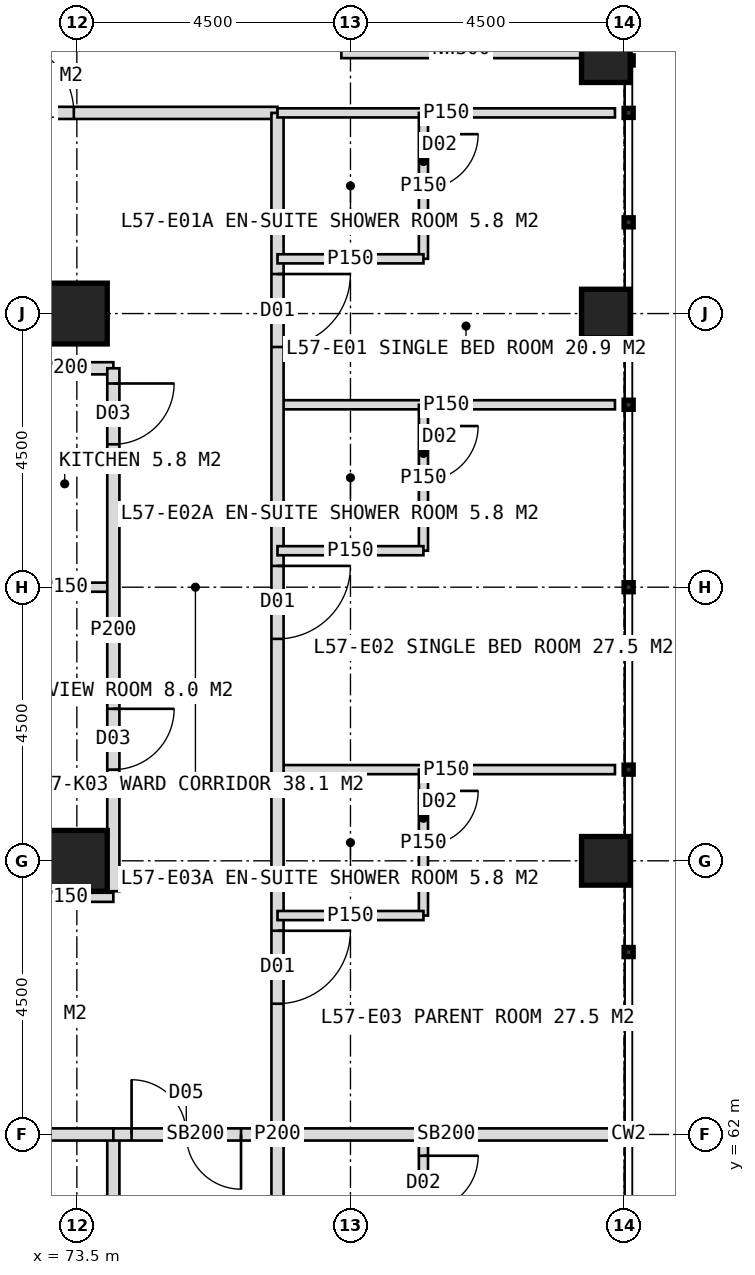
"""IFC4 building model, lengths in metres.
Left out: names, types, materials, properties, quantities, classifications, styles, units other than length and angle.
Written with IfcOpenShell. Run it as: python <this file> out.ifc"""

import sys

from ifc_helpers import new_model, si_unit, direction, frame, frame_2d, origin, origin_2d, place, context, subcontext, project, spatial, rectangle, hollow_rectangle, extrude, element, fill, save


model = new_model("IFC4")
c1 = context("Model", 3, precision=1e-05, world=origin(), true_north=direction((0.0, 1.0)))
c2 = subcontext(c1, "Body", "Model", "MODEL_VIEW")
j1 = project(units=[si_unit("LENGTHUNIT", "METRE"), si_unit("PLANEANGLEUNIT", "RADIAN")], contexts=[c1])
p1 = place(None, origin())
s1 = spatial("IfcSite", under=j1, at=p1, CompositionType="ELEMENT")
p2 = place(p1, origin())
s2 = spatial("IfcBuilding", under=s1, at=p2, CompositionType="ELEMENT")
p3 = place(p2, frame((0.0, 0.0, 237.0)))
s3 = spatial("IfcBuildingStorey", under=s2, at=p3, CompositionType="ELEMENT", Elevation=237.0)
for number, where, z_axis, x_axis in (
    (1, (73.5, 75.5, 0.0), (0.0, 0.0, 1.0), (1.0, 0.0, 0.0)),
    (2, (73.5, 66.5, 0.0), (0.0, 0.0, 1.0), (1.0, 0.0, 0.0)),
):
    element("IfcColumn", number, at=place(p3, frame(where, z_axis=z_axis, x_axis=x_axis)), inside=s3, PredefinedType="COLUMN", context=c2, shape_type="SweptSolid", body=[
        extrude(hollow_rectangle(XDim=1.0, YDim=1.0, WallThickness=0.1, at=origin_2d()), origin(), (0.0, 0.0, 1.0), 4.0),
    ])
for number, where, z_axis, x_axis in (
    (3, (82.2, 66.5, 0.0), (0.0, 0.0, 1.0), (1.0, 0.0, 0.0)),
    (4, (82.2, 75.5, 0.0), (0.0, 0.0, 1.0), (1.0, 0.0, 0.0)),
    (5, (82.2, 79.7, 0.0), (0.0, 0.0, 1.0), (1.0, 0.0, 0.0)),
):
    element("IfcColumn", number, at=place(p3, frame(where, z_axis=z_axis, x_axis=x_axis)), inside=s3, PredefinedType="COLUMN", context=c2, shape_type="SweptSolid", body=[
        extrude(hollow_rectangle(XDim=0.8, YDim=0.8, WallThickness=0.08, at=origin_2d()), origin(), (0.0, 0.0, 1.0), 4.0),
    ])
p4 = place(p3, frame((77.85, 79.85, 0.0), z_axis=(0.0, 0.0, 1.0), x_axis=(1.0, 0.0, 0.0)))
e6 = element("IfcWall", 6, at=p4, inside=s3, PredefinedType="ELEMENTEDWALL", context=c2, shape_type="SweptSolid", body=[
    extrude(rectangle(XDim=3.95, YDim=0.3, at=frame_2d((1.975, 0.0))), origin(), (0.0, 0.0, 1.0), 2.85),
])
p5 = place(p3, frame((43.2, 78.8, 0.0), z_axis=(0.0, 0.0, 1.0), x_axis=(1.0, 0.0, 0.0)))
e7 = element("IfcWall", 7, at=p5, inside=s3, PredefinedType="PARTITIONING", context=c2, shape_type="SweptSolid", body=[
    extrude(rectangle(XDim=33.6, YDim=0.2, at=frame_2d((16.8, 0.0))), origin(), (0.0, 0.0, 1.0), 3.75),
])
p6 = place(p5, frame((3.4, 0.0, 0.0)))
e8 = element("IfcOpeningElement", 8, at=p6, cuts=e7, PredefinedType="OPENING", context=c2, shape_type="SweptSolid", body=[
    extrude(rectangle(XDim=1.0, YDim=2.1, at=frame_2d((0.5, 1.05))), frame((0.0, 0.11, 0.0), z_axis=(0.0, -1.0, 0.0), x_axis=(1.0, 0.0, 0.0)), (0.0, 0.0, 1.0), 0.22),
])
p7 = place(p5, frame((11.05, 0.0, 0.0)))
e9 = element("IfcOpeningElement", 9, at=p7, cuts=e7, PredefinedType="OPENING", context=c2, shape_type="SweptSolid", body=[
    extrude(rectangle(XDim=1.2, YDim=2.2, at=frame_2d((0.6, 1.1))), frame((0.0, 0.11, 0.0), z_axis=(0.0, -1.0, 0.0), x_axis=(1.0, 0.0, 0.0)), (0.0, 0.0, 1.0), 0.22),
])
p8 = place(p5, frame((20.05, 0.0, 0.0)))
e10 = element("IfcOpeningElement", 10, at=p8, cuts=e7, PredefinedType="OPENING", context=c2, shape_type="SweptSolid", body=[
    extrude(rectangle(XDim=1.2, YDim=2.2, at=frame_2d((0.6, 1.1))), frame((0.0, 0.11, 0.0), z_axis=(0.0, -1.0, 0.0), x_axis=(1.0, 0.0, 0.0)), (0.0, 0.0, 1.0), 0.22),
])
p9 = place(p5, frame((29.05, 0.0, 0.0)))
e11 = element("IfcOpeningElement", 11, at=p9, cuts=e7, PredefinedType="OPENING", context=c2, shape_type="SweptSolid", body=[
    extrude(rectangle(XDim=1.2, YDim=2.2, at=frame_2d((0.6, 1.1))), frame((0.0, 0.11, 0.0), z_axis=(0.0, -1.0, 0.0), x_axis=(1.0, 0.0, 0.0)), (0.0, 0.0, 1.0), 0.22),
])
p10 = place(p3, frame((72.5, 74.6, 0.0), z_axis=(0.0, 0.0, 1.0), x_axis=(1.0, 0.0, 0.0)))
e12 = element("IfcWall", 12, at=p10, inside=s3, PredefinedType="PARTITIONING", context=c2, shape_type="SweptSolid", body=[
    extrude(rectangle(XDim=1.6, YDim=0.2, at=frame_2d((0.8, 0.0))), origin(), (0.0, 0.0, 1.0), 3.75),
])
for number, where, z_axis, x_axis in (
    (13, (76.8, 74.0, 0.0), (0.0, 0.0, 1.0), (1.0, 0.0, 0.0)),
    (14, (76.8, 68.0, 0.0), (0.0, 0.0, 1.0), (1.0, 0.0, 0.0)),
):
    element("IfcWall", number, at=place(p3, frame(where, z_axis=z_axis, x_axis=x_axis)), inside=s3, PredefinedType="PARTITIONING", context=c2, shape_type="SweptSolid", body=[
        extrude(rectangle(XDim=5.55, YDim=0.15, at=frame_2d((2.775, 0.0))), origin(), (0.0, 0.0, 1.0), 3.75),
    ])
p11 = place(p3, frame((76.8, 62.0, 0.0), z_axis=(0.0, 0.0, 1.0), x_axis=(1.0, 0.0, 0.0)))
e15 = element("IfcWall", 15, at=p11, inside=s3, PredefinedType="SOLIDWALL", context=c2, shape_type="SweptSolid", body=[
    extrude(rectangle(XDim=5.55, YDim=0.2, at=frame_2d((2.775, 0.0))), origin(), (0.0, 0.0, 1.0), 2.95),
])
p12 = place(p3, frame((76.8, 78.8, 0.0), z_axis=(0.0, 0.0, 1.0), x_axis=(0.0, -1.0, 0.0)))
e16 = element("IfcWall", 16, at=p12, inside=s3, PredefinedType="PARTITIONING", context=c2, shape_type="SweptSolid", body=[
    extrude(rectangle(XDim=33.6, YDim=0.2, at=frame_2d((16.8, 0.0))), origin(), (0.0, 0.0, 1.0), 3.75),
])
p13 = place(p12, frame((2.65, 0.0, 0.0)))
e17 = element("IfcOpeningElement", 17, at=p13, cuts=e16, PredefinedType="OPENING", context=c2, shape_type="SweptSolid", body=[
    extrude(rectangle(XDim=1.2, YDim=2.2, at=frame_2d((0.6, 1.1))), frame((0.0, 0.11, 0.0), z_axis=(0.0, -1.0, 0.0), x_axis=(1.0, 0.0, 0.0)), (0.0, 0.0, 1.0), 0.22),
])
p14 = place(p12, frame((7.45, 0.0, 0.0)))
e18 = element("IfcOpeningElement", 18, at=p14, cuts=e16, PredefinedType="OPENING", context=c2, shape_type="SweptSolid", body=[
    extrude(rectangle(XDim=1.2, YDim=2.2, at=frame_2d((0.6, 1.1))), frame((0.0, 0.11, 0.0), z_axis=(0.0, -1.0, 0.0), x_axis=(1.0, 0.0, 0.0)), (0.0, 0.0, 1.0), 0.22),
])
p15 = place(p12, frame((13.45, 0.0, 0.0)))
e19 = element("IfcOpeningElement", 19, at=p15, cuts=e16, PredefinedType="OPENING", context=c2, shape_type="SweptSolid", body=[
    extrude(rectangle(XDim=1.2, YDim=2.2, at=frame_2d((0.6, 1.1))), frame((0.0, 0.11, 0.0), z_axis=(0.0, -1.0, 0.0), x_axis=(1.0, 0.0, 0.0)), (0.0, 0.0, 1.0), 0.22),
])
p16 = place(p12, frame((20.05, 0.0, 0.0)))
e20 = element("IfcOpeningElement", 20, at=p16, cuts=e16, PredefinedType="OPENING", context=c2, shape_type="SweptSolid", body=[
    extrude(rectangle(XDim=1.2, YDim=2.2, at=frame_2d((0.6, 1.1))), frame((0.0, 0.11, 0.0), z_axis=(0.0, -1.0, 0.0), x_axis=(1.0, 0.0, 0.0)), (0.0, 0.0, 1.0), 0.22),
])
p17 = place(p12, frame((29.05, 0.0, 0.0)))
e21 = element("IfcOpeningElement", 21, at=p17, cuts=e16, PredefinedType="OPENING", context=c2, shape_type="SweptSolid", body=[
    extrude(rectangle(XDim=1.2, YDim=2.2, at=frame_2d((0.6, 1.1))), frame((0.0, 0.11, 0.0), z_axis=(0.0, -1.0, 0.0), x_axis=(1.0, 0.0, 0.0)), (0.0, 0.0, 1.0), 0.22),
])
p18 = place(p3, frame((76.8, 78.8, 0.0), z_axis=(0.0, 0.0, 1.0), x_axis=(1.0, 0.0, 0.0)))
e22 = element("IfcWall", 22, at=p18, inside=s3, PredefinedType="PARTITIONING", context=c2, shape_type="SweptSolid", body=[
    extrude(rectangle(XDim=5.55, YDim=0.15, at=frame_2d((2.775, 0.0))), origin(), (0.0, 0.0, 1.0), 3.75),
])
p19 = place(p3, frame((79.2, 78.8, 0.0), z_axis=(0.0, 0.0, 1.0), x_axis=(0.0, -1.0, 0.0)))
e23 = element("IfcWall", 23, at=p19, inside=s3, PredefinedType="PARTITIONING", context=c2, shape_type="SweptSolid", body=[
    extrude(rectangle(XDim=2.4, YDim=0.15, at=frame_2d((1.2, 0.0))), origin(), (0.0, 0.0, 1.0), 3.75),
])
p20 = place(p19, frame((0.35, 0.0, 0.0)))
e24 = element("IfcOpeningElement", 24, at=p20, cuts=e23, PredefinedType="OPENING", context=c2, shape_type="SweptSolid", body=[
    extrude(rectangle(XDim=0.9, YDim=2.1, at=frame_2d((0.45, 1.05))), frame((0.0, 0.085, 0.0), z_axis=(0.0, -1.0, 0.0), x_axis=(1.0, 0.0, 0.0)), (0.0, 0.0, 1.0), 0.17),
])
p21 = place(p3, frame((76.8, 76.4, 0.0), z_axis=(0.0, 0.0, 1.0), x_axis=(1.0, 0.0, 0.0)))
e25 = element("IfcWall", 25, at=p21, inside=s3, PredefinedType="PARTITIONING", context=c2, shape_type="SweptSolid", body=[
    extrude(rectangle(XDim=2.4, YDim=0.15, at=frame_2d((1.2, 0.0))), origin(), (0.0, 0.0, 1.0), 3.75),
])
p22 = place(p3, frame((79.2, 74.0, 0.0), z_axis=(0.0, 0.0, 1.0), x_axis=(0.0, -1.0, 0.0)))
e26 = element("IfcWall", 26, at=p22, inside=s3, PredefinedType="PARTITIONING", context=c2, shape_type="SweptSolid", body=[
    extrude(rectangle(XDim=2.4, YDim=0.15, at=frame_2d((1.2, 0.0))), origin(), (0.0, 0.0, 1.0), 3.75),
])
p23 = place(p22, frame((0.35, 0.0, 0.0)))
e27 = element("IfcOpeningElement", 27, at=p23, cuts=e26, PredefinedType="OPENING", context=c2, shape_type="SweptSolid", body=[
    extrude(rectangle(XDim=0.9, YDim=2.1, at=frame_2d((0.45, 1.05))), frame((0.0, 0.085, 0.0), z_axis=(0.0, -1.0, 0.0), x_axis=(1.0, 0.0, 0.0)), (0.0, 0.0, 1.0), 0.17),
])
p24 = place(p3, frame((76.8, 71.6, 0.0), z_axis=(0.0, 0.0, 1.0), x_axis=(1.0, 0.0, 0.0)))
e28 = element("IfcWall", 28, at=p24, inside=s3, PredefinedType="PARTITIONING", context=c2, shape_type="SweptSolid", body=[
    extrude(rectangle(XDim=2.4, YDim=0.15, at=frame_2d((1.2, 0.0))), origin(), (0.0, 0.0, 1.0), 3.75),
])
p25 = place(p3, frame((79.2, 68.0, 0.0), z_axis=(0.0, 0.0, 1.0), x_axis=(0.0, -1.0, 0.0)))
e29 = element("IfcWall", 29, at=p25, inside=s3, PredefinedType="PARTITIONING", context=c2, shape_type="SweptSolid", body=[
    extrude(rectangle(XDim=2.4, YDim=0.15, at=frame_2d((1.2, 0.0))), origin(), (0.0, 0.0, 1.0), 3.75),
])
p26 = place(p25, frame((0.35, 0.0, 0.0)))
e30 = element("IfcOpeningElement", 30, at=p26, cuts=e29, PredefinedType="OPENING", context=c2, shape_type="SweptSolid", body=[
    extrude(rectangle(XDim=0.9, YDim=2.1, at=frame_2d((0.45, 1.05))), frame((0.0, 0.085, 0.0), z_axis=(0.0, -1.0, 0.0), x_axis=(1.0, 0.0, 0.0)), (0.0, 0.0, 1.0), 0.17),
])
p27 = place(p3, frame((76.8, 65.6, 0.0), z_axis=(0.0, 0.0, 1.0), x_axis=(1.0, 0.0, 0.0)))
e31 = element("IfcWall", 31, at=p27, inside=s3, PredefinedType="PARTITIONING", context=c2, shape_type="SweptSolid", body=[
    extrude(rectangle(XDim=2.4, YDim=0.15, at=frame_2d((1.2, 0.0))), origin(), (0.0, 0.0, 1.0), 3.75),
])
p28 = place(p3, frame((79.2, 62.0, 0.0), z_axis=(0.0, 0.0, 1.0), x_axis=(0.0, -1.0, 0.0)))
e32 = element("IfcWall", 32, at=p28, inside=s3, PredefinedType="PARTITIONING", context=c2, shape_type="SweptSolid", body=[
    extrude(rectangle(XDim=3.0, YDim=0.15, at=frame_2d((1.5, 0.0))), origin(), (0.0, 0.0, 1.0), 3.75),
])
p29 = place(p28, frame((0.35, 0.0, 0.0)))
e33 = element("IfcOpeningElement", 33, at=p29, cuts=e32, PredefinedType="OPENING", context=c2, shape_type="SweptSolid", body=[
    extrude(rectangle(XDim=0.9, YDim=2.1, at=frame_2d((0.45, 1.05))), frame((0.0, 0.085, 0.0), z_axis=(0.0, -1.0, 0.0), x_axis=(1.0, 0.0, 0.0)), (0.0, 0.0, 1.0), 0.17),
])
p30 = place(p3, frame((72.5, 71.0, 0.0), z_axis=(0.0, 0.0, 1.0), x_axis=(1.0, 0.0, 0.0)))
e34 = element("IfcWall", 34, at=p30, inside=s3, PredefinedType="PARTITIONING", context=c2, shape_type="SweptSolid", body=[
    extrude(rectangle(XDim=1.6, YDim=0.15, at=frame_2d((0.8, 0.0))), origin(), (0.0, 0.0, 1.0), 3.75),
])
p31 = place(p3, frame((74.1, 74.6, 0.0), z_axis=(0.0, 0.0, 1.0), x_axis=(0.0, -1.0, 0.0)))
e35 = element("IfcWall", 35, at=p31, inside=s3, PredefinedType="PARTITIONING", context=c2, shape_type="SweptSolid", body=[
    extrude(rectangle(XDim=8.6, YDim=0.2, at=frame_2d((4.3, 0.0))), origin(), (0.0, 0.0, 1.0), 3.75),
])
p32 = place(p31, frame((0.25, 0.0, 0.0)))
e36 = element("IfcOpeningElement", 36, at=p32, cuts=e35, PredefinedType="OPENING", context=c2, shape_type="SweptSolid", body=[
    extrude(rectangle(XDim=1.0, YDim=2.1, at=frame_2d((0.5, 1.05))), frame((0.0, 0.11, 0.0), z_axis=(0.0, -1.0, 0.0), x_axis=(1.0, 0.0, 0.0)), (0.0, 0.0, 1.0), 0.22),
])
p33 = place(p31, frame((5.6, 0.0, 0.0)))
e37 = element("IfcOpeningElement", 37, at=p33, cuts=e35, PredefinedType="OPENING", context=c2, shape_type="SweptSolid", body=[
    extrude(rectangle(XDim=1.0, YDim=2.1, at=frame_2d((0.5, 1.05))), frame((0.0, 0.11, 0.0), z_axis=(0.0, -1.0, 0.0), x_axis=(1.0, 0.0, 0.0)), (0.0, 0.0, 1.0), 0.22),
])
p34 = place(p3, frame((74.1, 62.0, 0.0), z_axis=(0.0, 0.0, 1.0), x_axis=(0.0, -1.0, 0.0)))
e38 = element("IfcWall", 38, at=p34, inside=s3, PredefinedType="PARTITIONING", context=c2, shape_type="SweptSolid", body=[
    extrude(rectangle(XDim=14.1, YDim=0.2, at=frame_2d((7.05, 0.0))), origin(), (0.0, 0.0, 1.0), 3.75),
])
p35 = place(p34, frame((2.5, 0.0, 0.0)))
e39 = element("IfcOpeningElement", 39, at=p35, cuts=e38, PredefinedType="OPENING", context=c2, shape_type="SweptSolid", body=[
    extrude(rectangle(XDim=1.0, YDim=2.1, at=frame_2d((0.5, 1.05))), frame((0.0, 0.11, 0.0), z_axis=(0.0, -1.0, 0.0), x_axis=(1.0, 0.0, 0.0)), (0.0, 0.0, 1.0), 0.22),
])
p36 = place(p34, frame((7.0, 0.0, 0.0)))
e40 = element("IfcOpeningElement", 40, at=p36, cuts=e38, PredefinedType="OPENING", context=c2, shape_type="SweptSolid", body=[
    extrude(rectangle(XDim=1.0, YDim=2.1, at=frame_2d((0.5, 1.05))), frame((0.0, 0.11, 0.0), z_axis=(0.0, -1.0, 0.0), x_axis=(1.0, 0.0, 0.0)), (0.0, 0.0, 1.0), 0.22),
])
p37 = place(p34, frame((11.05, 0.0, 0.0)))
e41 = element("IfcOpeningElement", 41, at=p37, cuts=e38, PredefinedType="OPENING", context=c2, shape_type="SweptSolid", body=[
    extrude(rectangle(XDim=1.0, YDim=2.1, at=frame_2d((0.5, 1.05))), frame((0.0, 0.11, 0.0), z_axis=(0.0, -1.0, 0.0), x_axis=(1.0, 0.0, 0.0)), (0.0, 0.0, 1.0), 0.22),
])
p38 = place(p3, frame((72.5, 65.9, 0.0), z_axis=(0.0, 0.0, 1.0), x_axis=(1.0, 0.0, 0.0)))
e42 = element("IfcWall", 42, at=p38, inside=s3, PredefinedType="PARTITIONING", context=c2, shape_type="SweptSolid", body=[
    extrude(rectangle(XDim=1.6, YDim=0.15, at=frame_2d((0.8, 0.0))), origin(), (0.0, 0.0, 1.0), 3.75),
])
p39 = place(p3, frame((69.0, 62.0, 0.0), z_axis=(0.0, 0.0, 1.0), x_axis=(1.0, 0.0, 0.0)))
e43 = element("IfcWall", 43, at=p39, inside=s3, PredefinedType="SOLIDWALL", context=c2, shape_type="SweptSolid", body=[
    extrude(rectangle(XDim=5.1, YDim=0.2, at=frame_2d((2.55, 0.0))), origin(), (0.0, 0.0, 1.0), 2.95),
])
p40 = place(p3, frame((74.1, 62.0, 0.0), z_axis=(0.0, 0.0, 1.0), x_axis=(1.0, 0.0, 0.0)))
e44 = element("IfcWall", 44, at=p40, inside=s3, PredefinedType="SOLIDWALL", context=c2, shape_type="SweptSolid", body=[
    extrude(rectangle(XDim=2.7, YDim=0.2, at=frame_2d((1.35, 0.0))), origin(), (0.0, 0.0, 1.0), 2.95),
])
p41 = place(p40, frame((0.3, 0.0, 0.0)))
e45 = element("IfcOpeningElement", 45, at=p41, cuts=e44, PredefinedType="OPENING", context=c2, shape_type="SweptSolid", body=[
    extrude(rectangle(XDim=1.8, YDim=2.2, at=frame_2d((0.9, 1.1))), frame((0.0, 0.11, 0.0), z_axis=(0.0, -1.0, 0.0), x_axis=(1.0, 0.0, 0.0)), (0.0, 0.0, 1.0), 0.22),
])
p42 = place(p9, origin())
e46 = element("IfcDoor", 46, at=p42, inside=s3, OperationType="SINGLE_SWING_LEFT", PredefinedType="DOOR", context=c2, shape_type="SweptSolid", body=[
    extrude(rectangle(XDim=1.2, YDim=2.2, at=frame_2d((0.6, 1.1))), frame((0.0, 0.025, 0.0), z_axis=(0.0, -1.0, 0.0), x_axis=(1.0, 0.0, 0.0)), (0.0, 0.0, 1.0), 0.05),
])
fill(e11, e46)
p43 = place(p32, origin())
e47 = element("IfcDoor", 47, at=p43, inside=s3, OperationType="SINGLE_SWING_LEFT", PredefinedType="DOOR", context=c2, shape_type="SweptSolid", body=[
    extrude(rectangle(XDim=1.0, YDim=2.1, at=frame_2d((0.5, 1.05))), frame((0.0, 0.025, 0.0), z_axis=(0.0, -1.0, 0.0), x_axis=(1.0, 0.0, 0.0)), (0.0, 0.0, 1.0), 0.05),
])
fill(e36, e47)
p44 = place(p13, origin())
e48 = element("IfcDoor", 48, at=p44, inside=s3, OperationType="SINGLE_SWING_LEFT", PredefinedType="DOOR", context=c2, shape_type="SweptSolid", body=[
    extrude(rectangle(XDim=1.2, YDim=2.2, at=frame_2d((0.6, 1.1))), frame((0.0, 0.025, 0.0), z_axis=(0.0, -1.0, 0.0), x_axis=(1.0, 0.0, 0.0)), (0.0, 0.0, 1.0), 0.05),
])
fill(e17, e48)
p45 = place(p20, origin())
e49 = element("IfcDoor", 49, at=p45, inside=s3, OperationType="SINGLE_SWING_LEFT", PredefinedType="DOOR", context=c2, shape_type="SweptSolid", body=[
    extrude(rectangle(XDim=0.9, YDim=2.1, at=frame_2d((0.45, 1.05))), frame((0.0, 0.025, 0.0), z_axis=(0.0, -1.0, 0.0), x_axis=(1.0, 0.0, 0.0)), (0.0, 0.0, 1.0), 0.05),
])
fill(e24, e49)
p46 = place(p14, origin())
e50 = element("IfcDoor", 50, at=p46, inside=s3, OperationType="SINGLE_SWING_LEFT", PredefinedType="DOOR", context=c2, shape_type="SweptSolid", body=[
    extrude(rectangle(XDim=1.2, YDim=2.2, at=frame_2d((0.6, 1.1))), frame((0.0, 0.025, 0.0), z_axis=(0.0, -1.0, 0.0), x_axis=(1.0, 0.0, 0.0)), (0.0, 0.0, 1.0), 0.05),
])
fill(e18, e50)
p47 = place(p23, origin())
e51 = element("IfcDoor", 51, at=p47, inside=s3, OperationType="SINGLE_SWING_LEFT", PredefinedType="DOOR", context=c2, shape_type="SweptSolid", body=[
    extrude(rectangle(XDim=0.9, YDim=2.1, at=frame_2d((0.45, 1.05))), frame((0.0, 0.025, 0.0), z_axis=(0.0, -1.0, 0.0), x_axis=(1.0, 0.0, 0.0)), (0.0, 0.0, 1.0), 0.05),
])
fill(e27, e51)
p48 = place(p15, origin())
e52 = element("IfcDoor", 52, at=p48, inside=s3, OperationType="SINGLE_SWING_LEFT", PredefinedType="DOOR", context=c2, shape_type="SweptSolid", body=[
    extrude(rectangle(XDim=1.2, YDim=2.2, at=frame_2d((0.6, 1.1))), frame((0.0, 0.025, 0.0), z_axis=(0.0, -1.0, 0.0), x_axis=(1.0, 0.0, 0.0)), (0.0, 0.0, 1.0), 0.05),
])
fill(e19, e52)
p49 = place(p26, origin())
e53 = element("IfcDoor", 53, at=p49, inside=s3, OperationType="SINGLE_SWING_LEFT", PredefinedType="DOOR", context=c2, shape_type="SweptSolid", body=[
    extrude(rectangle(XDim=0.9, YDim=2.1, at=frame_2d((0.45, 1.05))), frame((0.0, 0.025, 0.0), z_axis=(0.0, -1.0, 0.0), x_axis=(1.0, 0.0, 0.0)), (0.0, 0.0, 1.0), 0.05),
])
fill(e30, e53)
p50 = place(p29, origin())
e54 = element("IfcDoor", 54, at=p50, inside=s3, OperationType="SINGLE_SWING_LEFT", PredefinedType="DOOR", context=c2, shape_type="SweptSolid", body=[
    extrude(rectangle(XDim=0.9, YDim=2.1, at=frame_2d((0.45, 1.05))), frame((0.0, 0.025, 0.0), z_axis=(0.0, -1.0, 0.0), x_axis=(1.0, 0.0, 0.0)), (0.0, 0.0, 1.0), 0.05),
])
fill(e33, e54)
p51 = place(p33, origin())
e55 = element("IfcDoor", 55, at=p51, inside=s3, OperationType="SINGLE_SWING_LEFT", PredefinedType="DOOR", context=c2, shape_type="SweptSolid", body=[
    extrude(rectangle(XDim=1.0, YDim=2.1, at=frame_2d((0.5, 1.05))), frame((0.0, 0.025, 0.0), z_axis=(0.0, -1.0, 0.0), x_axis=(1.0, 0.0, 0.0)), (0.0, 0.0, 1.0), 0.05),
])
fill(e37, e55)
p52 = place(p41, origin())
e56 = element("IfcDoor", 56, at=p52, inside=s3, OperationType="DOUBLE_DOOR_DOUBLE_SWING", PredefinedType="DOOR", context=c2, shape_type="SweptSolid", body=[
    extrude(rectangle(XDim=1.8, YDim=2.2, at=frame_2d((0.9, 1.1))), frame((0.0, 0.025, 0.0), z_axis=(0.0, -1.0, 0.0), x_axis=(1.0, 0.0, 0.0)), (0.0, 0.0, 1.0), 0.05),
])
fill(e45, e56)
save(model, sys.argv[1])
